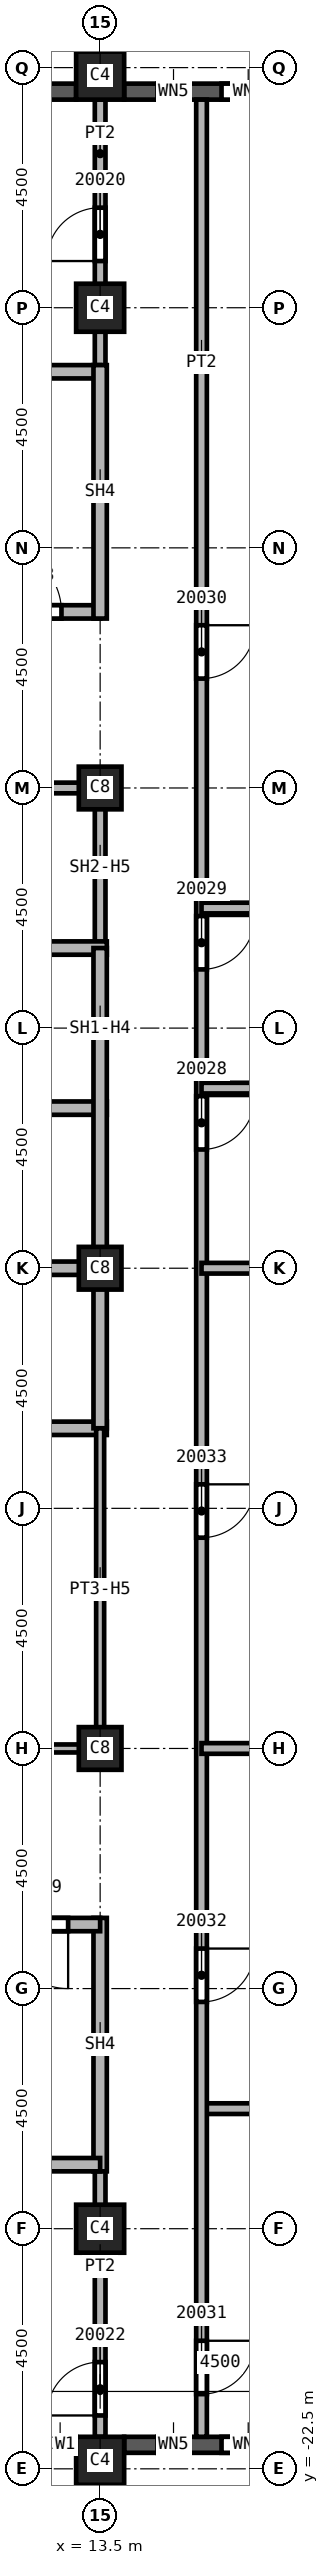
"""IFC4 building model, lengths in metres.
Left out: names, types, materials, properties, quantities, classifications, styles, units other than length and angle.
Written with IfcOpenShell. Run it as: python <this file> out.ifc"""

import sys

from ifc_helpers import new_model, si_unit, direction, frame, frame_2d, origin, origin_2d, place, context, subcontext, project, spatial, rectangle, extrude, element, fill, save


model = new_model("IFC4")
c1 = context("Model", 3, precision=1e-05, world=origin(), true_north=direction((0.0, 1.0)))
c2 = subcontext(c1, "Body", "Model", "MODEL_VIEW")
j1 = project(units=[si_unit("LENGTHUNIT", "METRE"), si_unit("PLANEANGLEUNIT", "RADIAN")], contexts=[c1])
p1 = place(None, origin())
s1 = spatial("IfcSite", under=j1, at=p1, CompositionType="ELEMENT")
p2 = place(p1, origin())
s2 = spatial("IfcBuilding", under=s1, at=p2, CompositionType="ELEMENT")
p3 = place(p2, frame((0.0, 0.0, 290.0)))
s3 = spatial("IfcBuildingStorey", under=s2, at=p3, CompositionType="ELEMENT", Elevation=290.0)
for number, where, z_axis, x_axis in (
    (1, (13.5, 18.0, 0.0), (0.0, 0.0, 1.0), (1.0, 0.0, 0.0)),
    (2, (13.5, -18.0, 0.0), (0.0, 0.0, 1.0), (1.0, 0.0, 0.0)),
):
    element("IfcColumn", number, at=place(p3, frame(where, z_axis=z_axis, x_axis=x_axis)), inside=s3, PredefinedType="COLUMN", context=c2, shape_type="SweptSolid", body=[
        extrude(rectangle(XDim=0.9, YDim=0.9, at=origin_2d()), origin(), (0.0, 0.0, 1.0), 3.59),
    ])
for number, where, z_axis, x_axis in (
    (3, (13.5, 0.0, 0.0), (0.0, 0.0, 1.0), (1.0, 0.0, 0.0)),
    (4, (13.5, 9.0, 0.0), (0.0, 0.0, 1.0), (1.0, 0.0, 0.0)),
    (5, (13.5, -9.0, 0.0), (0.0, 0.0, 1.0), (1.0, 0.0, 0.0)),
):
    element("IfcColumn", number, at=place(p3, frame(where, z_axis=z_axis, x_axis=x_axis)), inside=s3, PredefinedType="COLUMN", context=c2, shape_type="SweptSolid", body=[
        extrude(rectangle(XDim=0.8, YDim=0.8, at=origin_2d()), origin(), (0.0, 0.0, 1.0), 3.59),
    ])
for number, where, z_axis, x_axis in (
    (6, (13.5, 22.35, 0.0), (0.0, 0.0, 1.0), (1.0, 0.0, 0.0)),
    (7, (13.5, -22.35, 0.0), (0.0, 0.0, 1.0), (1.0, 0.0, 0.0)),
):
    element("IfcColumn", number, at=place(p3, frame(where, z_axis=z_axis, x_axis=x_axis)), inside=s3, PredefinedType="COLUMN", context=c2, shape_type="SweptSolid", body=[
        extrude(rectangle(XDim=0.9, YDim=0.9, at=origin_2d()), origin(), (0.0, 0.0, 1.0), 3.59),
    ])
p4 = place(p3, frame((9.45, -22.05, 0.0), z_axis=(0.0, 0.0, 1.0), x_axis=(1.0, 0.0, 0.0)))
e8 = element("IfcWall", 8, at=p4, inside=s3, PredefinedType="SOLIDWALL", context=c2, shape_type="SweptSolid", body=[
    extrude(rectangle(XDim=3.6, YDim=0.3, at=frame_2d((1.8, 0.0))), origin(), (0.0, 0.0, 1.0), 2.99),
])
p5 = place(p4, frame((0.6, 0.0, 0.8)))
e9 = element("IfcOpeningElement", 9, at=p5, cuts=e8, PredefinedType="OPENING", context=c2, shape_type="SweptSolid", body=[
    extrude(rectangle(XDim=2.4, YDim=1.95, at=frame_2d((1.2, 0.975))), frame((0.0, 0.15, 0.0), z_axis=(0.0, -1.0, 0.0), x_axis=(1.0, 0.0, 0.0)), (0.0, 0.0, 1.0), 0.3),
])
p6 = place(p3, frame((13.95, -22.05, 0.0), z_axis=(0.0, 0.0, 1.0), x_axis=(1.0, 0.0, 0.0)))
e10 = element("IfcWall", 10, at=p6, inside=s3, PredefinedType="SOLIDWALL", context=c2, shape_type="SweptSolid", body=[
    extrude(rectangle(XDim=3.6, YDim=0.3, at=frame_2d((1.8, 0.0))), origin(), (0.0, 0.0, 1.0), 2.99),
])
p7 = place(p6, frame((0.625, 0.0, 0.8)))
e11 = element("IfcOpeningElement", 11, at=p7, cuts=e10, PredefinedType="OPENING", context=c2, shape_type="SweptSolid", body=[
    extrude(rectangle(XDim=0.6, YDim=1.95, at=frame_2d((0.3, 0.975))), frame((0.0, 0.15, 0.0), z_axis=(0.0, -1.0, 0.0), x_axis=(1.0, 0.0, 0.0)), (0.0, 0.0, 1.0), 0.3),
])
p8 = place(p6, frame((1.825, 0.0, 0.8)))
e12 = element("IfcOpeningElement", 12, at=p8, cuts=e10, PredefinedType="OPENING", context=c2, shape_type="SweptSolid", body=[
    extrude(rectangle(XDim=1.0, YDim=1.95, at=frame_2d((0.5, 0.975))), frame((0.0, 0.15, 0.0), z_axis=(0.0, -1.0, 0.0), x_axis=(1.0, 0.0, 0.0)), (0.0, 0.0, 1.0), 0.3),
])
p9 = place(p3, frame((17.55, 22.05, 0.0), z_axis=(0.0, 0.0, 1.0), x_axis=(-1.0, 0.0, 0.0)))
e13 = element("IfcWall", 13, at=p9, inside=s3, PredefinedType="SOLIDWALL", context=c2, shape_type="SweptSolid", body=[
    extrude(rectangle(XDim=3.6, YDim=0.3, at=frame_2d((1.8, 0.0))), origin(), (0.0, 0.0, 1.0), 2.99),
])
p10 = place(p9, frame((0.775, 0.0, 0.8)))
e14 = element("IfcOpeningElement", 14, at=p10, cuts=e13, PredefinedType="OPENING", context=c2, shape_type="SweptSolid", body=[
    extrude(rectangle(XDim=1.0, YDim=1.95, at=frame_2d((0.5, 0.975))), frame((0.0, 0.15, 0.0), z_axis=(0.0, -1.0, 0.0), x_axis=(1.0, 0.0, 0.0)), (0.0, 0.0, 1.0), 0.3),
])
p11 = place(p9, frame((2.375, 0.0, 0.8)))
e15 = element("IfcOpeningElement", 15, at=p11, cuts=e13, PredefinedType="OPENING", context=c2, shape_type="SweptSolid", body=[
    extrude(rectangle(XDim=0.6, YDim=1.95, at=frame_2d((0.3, 0.975))), frame((0.0, 0.15, 0.0), z_axis=(0.0, -1.0, 0.0), x_axis=(1.0, 0.0, 0.0)), (0.0, 0.0, 1.0), 0.3),
])
p12 = place(p3, frame((13.05, 22.05, 0.0), z_axis=(0.0, 0.0, 1.0), x_axis=(-1.0, 0.0, 0.0)))
e16 = element("IfcWall", 16, at=p12, inside=s3, PredefinedType="SOLIDWALL", context=c2, shape_type="SweptSolid", body=[
    extrude(rectangle(XDim=3.6, YDim=0.3, at=frame_2d((1.8, 0.0))), origin(), (0.0, 0.0, 1.0), 2.99),
])
p13 = place(p12, frame((0.6, 0.0, 0.8)))
e17 = element("IfcOpeningElement", 17, at=p13, cuts=e16, PredefinedType="OPENING", context=c2, shape_type="SweptSolid", body=[
    extrude(rectangle(XDim=2.4, YDim=1.95, at=frame_2d((1.2, 0.975))), frame((0.0, 0.15, 0.0), z_axis=(0.0, -1.0, 0.0), x_axis=(1.0, 0.0, 0.0)), (0.0, 0.0, 1.0), 0.3),
])
p14 = place(p3, frame((13.5, -21.9, 0.0), z_axis=(0.0, 0.0, 1.0), x_axis=(0.0, 1.0, 0.0)))
e18 = element("IfcWall", 18, at=p14, inside=s3, PredefinedType="PARTITIONING", context=c2, shape_type="SweptSolid", body=[
    extrude(rectangle(XDim=5.225, YDim=0.2, at=frame_2d((2.612, 0.0))), origin(), (0.0, 0.0, 1.0), 3.59),
])
p15 = place(p14, frame((0.4, 0.0, 0.0)))
e19 = element("IfcOpeningElement", 19, at=p15, cuts=e18, PredefinedType="OPENING", context=c2, shape_type="SweptSolid", body=[
    extrude(rectangle(XDim=1.0, YDim=2.1, at=frame_2d((0.5, 1.05))), frame((0.0, 0.1, 0.0), z_axis=(0.0, -1.0, 0.0), x_axis=(1.0, 0.0, 0.0)), (0.0, 0.0, 1.0), 0.2),
])
p16 = place(p3, frame((13.5, 16.675, 0.0), z_axis=(0.0, 0.0, 1.0), x_axis=(0.0, 1.0, 0.0)))
e20 = element("IfcWall", 20, at=p16, inside=s3, PredefinedType="PARTITIONING", context=c2, shape_type="SweptSolid", body=[
    extrude(rectangle(XDim=5.225, YDim=0.2, at=frame_2d((2.612, 0.0))), origin(), (0.0, 0.0, 1.0), 3.59),
])
p17 = place(p16, frame((2.2, 0.0, 0.0)))
e21 = element("IfcOpeningElement", 21, at=p17, cuts=e20, PredefinedType="OPENING", context=c2, shape_type="SweptSolid", body=[
    extrude(rectangle(XDim=1.0, YDim=2.1, at=frame_2d((0.5, 1.05))), frame((0.0, 0.1, 0.0), z_axis=(0.0, -1.0, 0.0), x_axis=(1.0, 0.0, 0.0)), (0.0, 0.0, 1.0), 0.2),
])
p18 = place(p3, frame((15.4, -15.75, 0.0), z_axis=(0.0, 0.0, 1.0), x_axis=(1.0, 0.0, 0.0)))
e22 = element("IfcWall", 22, at=p18, inside=s3, PredefinedType="PARTITIONING", context=c2, shape_type="SweptSolid", body=[
    extrude(rectangle(XDim=11.15, YDim=0.2, at=frame_2d((5.575, 0.0))), origin(), (0.0, 0.0, 1.0), 3.59),
])
p19 = place(p3, frame((15.4, 21.9, 0.0), z_axis=(0.0, 0.0, 1.0), x_axis=(0.0, -1.0, 0.0)))
e23 = element("IfcWall", 23, at=p19, inside=s3, PredefinedType="PARTITIONING", context=c2, shape_type="SweptSolid", body=[
    extrude(rectangle(XDim=43.8, YDim=0.2, at=frame_2d((21.9, 0.0))), origin(), (0.0, 0.0, 1.0), 3.59),
])
p20 = place(p19, frame((18.675, 0.0, 0.0)))
e24 = element("IfcOpeningElement", 24, at=p20, cuts=e23, PredefinedType="OPENING", context=c2, shape_type="SweptSolid", body=[
    extrude(rectangle(XDim=1.0, YDim=2.1, at=frame_2d((0.5, 1.05))), frame((0.0, 0.1, 0.0), z_axis=(0.0, -1.0, 0.0), x_axis=(1.0, 0.0, 0.0)), (0.0, 0.0, 1.0), 0.2),
])
p21 = place(p19, frame((15.3, 0.0, 0.0)))
e25 = element("IfcOpeningElement", 25, at=p21, cuts=e23, PredefinedType="OPENING", context=c2, shape_type="SweptSolid", body=[
    extrude(rectangle(XDim=1.0, YDim=2.1, at=frame_2d((0.5, 1.05))), frame((0.0, 0.1, 0.0), z_axis=(0.0, -1.0, 0.0), x_axis=(1.0, 0.0, 0.0)), (0.0, 0.0, 1.0), 0.2),
])
p22 = place(p19, frame((9.85, 0.0, 0.0)))
e26 = element("IfcOpeningElement", 26, at=p22, cuts=e23, PredefinedType="OPENING", context=c2, shape_type="SweptSolid", body=[
    extrude(rectangle(XDim=1.0, YDim=2.1, at=frame_2d((0.5, 1.05))), frame((0.0, 0.1, 0.0), z_axis=(0.0, -1.0, 0.0), x_axis=(1.0, 0.0, 0.0)), (0.0, 0.0, 1.0), 0.2),
])
p23 = place(p19, frame((42.0, 0.0, 0.0)))
e27 = element("IfcOpeningElement", 27, at=p23, cuts=e23, PredefinedType="OPENING", context=c2, shape_type="SweptSolid", body=[
    extrude(rectangle(XDim=1.0, YDim=2.1, at=frame_2d((0.5, 1.05))), frame((0.0, 0.1, 0.0), z_axis=(0.0, -1.0, 0.0), x_axis=(1.0, 0.0, 0.0)), (0.0, 0.0, 1.0), 0.2),
])
p24 = place(p19, frame((34.65, 0.0, 0.0)))
e28 = element("IfcOpeningElement", 28, at=p24, cuts=e23, PredefinedType="OPENING", context=c2, shape_type="SweptSolid", body=[
    extrude(rectangle(XDim=1.0, YDim=2.1, at=frame_2d((0.5, 1.05))), frame((0.0, 0.1, 0.0), z_axis=(0.0, -1.0, 0.0), x_axis=(1.0, 0.0, 0.0)), (0.0, 0.0, 1.0), 0.2),
])
p25 = place(p19, frame((25.95, 0.0, 0.0)))
e29 = element("IfcOpeningElement", 29, at=p25, cuts=e23, PredefinedType="OPENING", context=c2, shape_type="SweptSolid", body=[
    extrude(rectangle(XDim=1.0, YDim=2.1, at=frame_2d((0.5, 1.05))), frame((0.0, 0.1, 0.0), z_axis=(0.0, -1.0, 0.0), x_axis=(1.0, 0.0, 0.0)), (0.0, 0.0, 1.0), 0.2),
])
p26 = place(p3, frame((15.4, -9.0, 0.0), z_axis=(0.0, 0.0, 1.0), x_axis=(1.0, 0.0, 0.0)))
e30 = element("IfcWall", 30, at=p26, inside=s3, PredefinedType="PARTITIONING", context=c2, shape_type="SweptSolid", body=[
    extrude(rectangle(XDim=4.6, YDim=0.2, at=frame_2d((2.3, 0.0))), origin(), (0.0, 0.0, 1.0), 3.59),
])
for number, where, z_axis, x_axis in (
    (31, (15.4, 3.375, 0.0), (0.0, 0.0, 1.0), (1.0, 0.0, 0.0)),
    (32, (15.4, 6.75, 0.0), (0.0, 0.0, 1.0), (1.0, 0.0, 0.0)),
    (33, (26.55, 0.0, 0.0), (0.0, 0.0, 1.0), (-1.0, 0.0, 0.0)),
):
    element("IfcWall", number, at=place(p3, frame(where, z_axis=z_axis, x_axis=x_axis)), inside=s3, PredefinedType="PARTITIONING", context=c2, shape_type="SweptSolid", body=[
        extrude(rectangle(XDim=11.15, YDim=0.2, at=frame_2d((5.575, 0.0))), origin(), (0.0, 0.0, 1.0), 3.59),
    ])
p27 = place(p3, frame((10.5, 9.0, 0.0), z_axis=(0.0, 0.0, 1.0), x_axis=(1.0, 0.0, 0.0)))
e34 = element("IfcWall", 34, at=p27, inside=s3, PredefinedType="SOLIDWALL", context=c2, shape_type="SweptSolid", body=[
    extrude(rectangle(XDim=3.0, YDim=0.2, at=frame_2d((1.5, 0.0))), origin(), (0.0, 0.0, 1.0), 2.828),
])
p28 = place(p3, frame((13.5, 9.1, 0.0), z_axis=(0.0, 0.0, 1.0), x_axis=(0.0, -1.0, 0.0)))
e35 = element("IfcWall", 35, at=p28, inside=s3, PredefinedType="SOLIDWALL", context=c2, shape_type="SweptSolid", body=[
    extrude(rectangle(XDim=3.1, YDim=0.2, at=frame_2d((1.55, 0.0))), origin(), (0.0, 0.0, 1.0), 2.828),
])
p29 = place(p3, frame((4.375, -3.0, 0.0), z_axis=(0.0, 0.0, 1.0), x_axis=(1.0, 0.0, 0.0)))
e36 = element("IfcWall", 36, at=p29, inside=s3, PredefinedType="SOLIDWALL", context=c2, shape_type="SweptSolid", body=[
    extrude(rectangle(XDim=9.25, YDim=0.25, at=frame_2d((4.625, 0.0))), origin(), (0.0, 0.0, 1.0), 3.59),
])
p30 = place(p29, frame((3.375, 0.0, 0.0)))
e37 = element("IfcOpeningElement", 37, at=p30, cuts=e36, PredefinedType="OPENING", context=c2, shape_type="SweptSolid", body=[
    extrude(rectangle(XDim=1.1, YDim=2.1, at=frame_2d((0.55, 1.05))), frame((0.0, 0.125, 0.0), z_axis=(0.0, -1.0, 0.0), x_axis=(1.0, 0.0, 0.0)), (0.0, 0.0, 1.0), 0.25),
])
p31 = place(p3, frame((7.5, 3.0, 0.0), z_axis=(0.0, 0.0, 1.0), x_axis=(1.0, 0.0, 0.0)))
e38 = element("IfcWall", 38, at=p31, inside=s3, PredefinedType="SOLIDWALL", context=c2, shape_type="SweptSolid", body=[
    extrude(rectangle(XDim=6.125, YDim=0.25, at=frame_2d((3.062, 0.0))), origin(), (0.0, 0.0, 1.0), 3.59),
])
p32 = place(p31, frame((0.25, 0.0, 0.0)))
e39 = element("IfcOpeningElement", 39, at=p32, cuts=e38, PredefinedType="OPENING", context=c2, shape_type="SweptSolid", body=[
    extrude(rectangle(XDim=1.1, YDim=2.1, at=frame_2d((0.55, 1.05))), frame((0.0, 0.125, 0.0), z_axis=(0.0, -1.0, 0.0), x_axis=(1.0, 0.0, 0.0)), (0.0, 0.0, 1.0), 0.25),
])
for number, where, z_axis, x_axis in (
    (40, (10.5, 0.0, 0.0), (0.0, 0.0, 1.0), (1.0, 0.0, 0.0)),
    (41, (10.5, 6.0, 0.0), (0.0, 0.0, 1.0), (1.0, 0.0, 0.0)),
):
    element("IfcWall", number, at=place(p3, frame(where, z_axis=z_axis, x_axis=x_axis)), inside=s3, PredefinedType="SOLIDWALL", context=c2, shape_type="SweptSolid", body=[
        extrude(rectangle(XDim=3.125, YDim=0.25, at=frame_2d((1.562, 0.0))), origin(), (0.0, 0.0, 1.0), 3.59),
    ])
p33 = place(p3, frame((13.5, 6.0, 0.0), z_axis=(0.0, 0.0, 1.0), x_axis=(0.0, -1.0, 0.0)))
e42 = element("IfcWall", 42, at=p33, inside=s3, PredefinedType="SOLIDWALL", context=c2, shape_type="SweptSolid", body=[
    extrude(rectangle(XDim=9.0, YDim=0.25, at=frame_2d((4.5, 0.0))), origin(), (0.0, 0.0, 1.0), 2.828),
])
p34 = place(p3, frame((4.375, 12.3, 0.0), z_axis=(0.0, 0.0, 1.0), x_axis=(1.0, 0.0, 0.0)))
e43 = element("IfcWall", 43, at=p34, inside=s3, PredefinedType="SOLIDWALL", context=c2, shape_type="SweptSolid", body=[
    extrude(rectangle(XDim=9.125, YDim=0.25, at=frame_2d((4.562, 0.0))), origin(), (0.0, 0.0, 1.0), 3.59),
])
p35 = place(p34, frame((7.2, 0.0, 0.0)))
e44 = element("IfcOpeningElement", 44, at=p35, cuts=e43, PredefinedType="OPENING", context=c2, shape_type="SweptSolid", body=[
    extrude(rectangle(XDim=1.2, YDim=2.1, at=frame_2d((0.6, 1.05))), frame((0.0, 0.125, 0.0), z_axis=(0.0, -1.0, 0.0), x_axis=(1.0, 0.0, 0.0)), (0.0, 0.0, 1.0), 0.25),
])
p36 = place(p3, frame((4.375, 16.8, 0.0), z_axis=(0.0, 0.0, 1.0), x_axis=(1.0, 0.0, 0.0)))
e45 = element("IfcWall", 45, at=p36, inside=s3, PredefinedType="SOLIDWALL", context=c2, shape_type="SweptSolid", body=[
    extrude(rectangle(XDim=9.125, YDim=0.25, at=frame_2d((4.562, 0.0))), origin(), (0.0, 0.0, 1.0), 3.59),
])
p37 = place(p3, frame((13.5, -16.925, 0.0), z_axis=(0.0, 0.0, 1.0), x_axis=(0.0, 1.0, 0.0)))
e46 = element("IfcWall", 46, at=p37, inside=s3, PredefinedType="SOLIDWALL", context=c2, shape_type="SweptSolid", body=[
    extrude(rectangle(XDim=4.75, YDim=0.25, at=frame_2d((2.375, 0.0))), origin(), (0.0, 0.0, 1.0), 3.59),
])
p38 = place(p3, frame((13.5, -16.8, 0.0), z_axis=(0.0, 0.0, 1.0), x_axis=(-1.0, 0.0, 0.0)))
e47 = element("IfcWall", 47, at=p38, inside=s3, PredefinedType="SOLIDWALL", context=c2, shape_type="SweptSolid", body=[
    extrude(rectangle(XDim=9.125, YDim=0.25, at=frame_2d((4.562, 0.0))), origin(), (0.0, 0.0, 1.0), 3.59),
])
p39 = place(p3, frame((13.5, -12.3, 0.0), z_axis=(0.0, 0.0, 1.0), x_axis=(-1.0, 0.0, 0.0)))
e48 = element("IfcWall", 48, at=p39, inside=s3, PredefinedType="SOLIDWALL", context=c2, shape_type="SweptSolid", body=[
    extrude(rectangle(XDim=9.125, YDim=0.25, at=frame_2d((4.562, 0.0))), origin(), (0.0, 0.0, 1.0), 3.59),
])
p40 = place(p39, frame((0.6, 0.0, 0.0)))
e49 = element("IfcOpeningElement", 49, at=p40, cuts=e48, PredefinedType="OPENING", context=c2, shape_type="SweptSolid", body=[
    extrude(rectangle(XDim=1.2, YDim=2.1, at=frame_2d((0.6, 1.05))), frame((0.0, 0.125, 0.0), z_axis=(0.0, -1.0, 0.0), x_axis=(1.0, 0.0, 0.0)), (0.0, 0.0, 1.0), 0.25),
])
p41 = place(p3, frame((13.5, 12.175, 0.0), z_axis=(0.0, 0.0, 1.0), x_axis=(0.0, 1.0, 0.0)))
e50 = element("IfcWall", 50, at=p41, inside=s3, PredefinedType="SOLIDWALL", context=c2, shape_type="SweptSolid", body=[
    extrude(rectangle(XDim=4.75, YDim=0.25, at=frame_2d((2.375, 0.0))), origin(), (0.0, 0.0, 1.0), 3.59),
])
p42 = place(p3, frame((13.5, -9.0, 0.0), z_axis=(0.0, 0.0, 1.0), x_axis=(-1.0, 0.0, 0.0)))
e51 = element("IfcWall", 51, at=p42, inside=s3, PredefinedType="PARTITIONING", context=c2, shape_type="SweptSolid", body=[
    extrude(rectangle(XDim=3.0, YDim=0.15, at=frame_2d((1.5, 0.0))), origin(), (0.0, 0.0, 1.0), 2.828),
])
p43 = place(p3, frame((13.5, -3.0, 0.0), z_axis=(0.0, 0.0, 1.0), x_axis=(0.0, -1.0, 0.0)))
e52 = element("IfcWall", 52, at=p43, inside=s3, PredefinedType="PARTITIONING", context=c2, shape_type="SweptSolid", body=[
    extrude(rectangle(XDim=6.075, YDim=0.15, at=frame_2d((3.038, 0.0))), origin(), (0.0, 0.0, 1.0), 2.828),
])
p44 = place(p35, origin())
e53 = element("IfcDoor", 53, at=p44, inside=s3, OperationType="SINGLE_SWING_LEFT", PredefinedType="DOOR", context=c2, shape_type="SweptSolid", body=[
    extrude(rectangle(XDim=1.2, YDim=2.1, at=frame_2d((0.6, 1.05))), frame((0.0, 0.025, 0.0), z_axis=(0.0, -1.0, 0.0), x_axis=(1.0, 0.0, 0.0)), (0.0, 0.0, 1.0), 0.05),
])
fill(e44, e53)
p45 = place(p40, origin())
e54 = element("IfcDoor", 54, at=p45, inside=s3, OperationType="SINGLE_SWING_RIGHT", PredefinedType="DOOR", context=c2, shape_type="SweptSolid", body=[
    extrude(rectangle(XDim=1.2, YDim=2.1, at=frame_2d((0.6, 1.05))), frame((0.0, 0.025, 0.0), z_axis=(0.0, -1.0, 0.0), x_axis=(1.0, 0.0, 0.0)), (0.0, 0.0, 1.0), 0.05),
])
fill(e49, e54)
p46 = place(p17, origin())
e55 = element("IfcDoor", 55, at=p46, inside=s3, OperationType="SINGLE_SWING_LEFT", PredefinedType="DOOR", context=c2, shape_type="SweptSolid", body=[
    extrude(rectangle(XDim=1.0, YDim=2.1, at=frame_2d((0.5, 1.05))), frame((0.0, 0.025, 0.0), z_axis=(0.0, -1.0, 0.0), x_axis=(1.0, 0.0, 0.0)), (0.0, 0.0, 1.0), 0.05),
])
fill(e21, e55)
p47 = place(p15, origin())
e56 = element("IfcDoor", 56, at=p47, inside=s3, OperationType="SINGLE_SWING_LEFT", PredefinedType="DOOR", context=c2, shape_type="SweptSolid", body=[
    extrude(rectangle(XDim=1.0, YDim=2.1, at=frame_2d((0.5, 1.05))), frame((0.0, 0.025, 0.0), z_axis=(0.0, -1.0, 0.0), x_axis=(1.0, 0.0, 0.0)), (0.0, 0.0, 1.0), 0.05),
])
fill(e19, e56)
p48 = place(p20, origin())
e57 = element("IfcDoor", 57, at=p48, inside=s3, OperationType="SINGLE_SWING_LEFT", PredefinedType="DOOR", context=c2, shape_type="SweptSolid", body=[
    extrude(rectangle(XDim=1.0, YDim=2.1, at=frame_2d((0.5, 1.05))), frame((0.0, 0.025, 0.0), z_axis=(0.0, -1.0, 0.0), x_axis=(1.0, 0.0, 0.0)), (0.0, 0.0, 1.0), 0.05),
])
fill(e24, e57)
p49 = place(p21, origin())
e58 = element("IfcDoor", 58, at=p49, inside=s3, OperationType="SINGLE_SWING_RIGHT", PredefinedType="DOOR", context=c2, shape_type="SweptSolid", body=[
    extrude(rectangle(XDim=1.0, YDim=2.1, at=frame_2d((0.5, 1.05))), frame((0.0, 0.025, 0.0), z_axis=(0.0, -1.0, 0.0), x_axis=(1.0, 0.0, 0.0)), (0.0, 0.0, 1.0), 0.05),
])
fill(e25, e58)
p50 = place(p22, origin())
e59 = element("IfcDoor", 59, at=p50, inside=s3, OperationType="SINGLE_SWING_LEFT", PredefinedType="DOOR", context=c2, shape_type="SweptSolid", body=[
    extrude(rectangle(XDim=1.0, YDim=2.1, at=frame_2d((0.5, 1.05))), frame((0.0, 0.025, 0.0), z_axis=(0.0, -1.0, 0.0), x_axis=(1.0, 0.0, 0.0)), (0.0, 0.0, 1.0), 0.05),
])
fill(e26, e59)
p51 = place(p23, origin())
e60 = element("IfcDoor", 60, at=p51, inside=s3, OperationType="SINGLE_SWING_RIGHT", PredefinedType="DOOR", context=c2, shape_type="SweptSolid", body=[
    extrude(rectangle(XDim=1.0, YDim=2.1, at=frame_2d((0.5, 1.05))), frame((0.0, 0.025, 0.0), z_axis=(0.0, -1.0, 0.0), x_axis=(1.0, 0.0, 0.0)), (0.0, 0.0, 1.0), 0.05),
])
fill(e27, e60)
p52 = place(p24, origin())
e61 = element("IfcDoor", 61, at=p52, inside=s3, OperationType="SINGLE_SWING_LEFT", PredefinedType="DOOR", context=c2, shape_type="SweptSolid", body=[
    extrude(rectangle(XDim=1.0, YDim=2.1, at=frame_2d((0.5, 1.05))), frame((0.0, 0.025, 0.0), z_axis=(0.0, -1.0, 0.0), x_axis=(1.0, 0.0, 0.0)), (0.0, 0.0, 1.0), 0.05),
])
fill(e28, e61)
p53 = place(p25, origin())
e62 = element("IfcDoor", 62, at=p53, inside=s3, OperationType="SINGLE_SWING_RIGHT", PredefinedType="DOOR", context=c2, shape_type="SweptSolid", body=[
    extrude(rectangle(XDim=1.0, YDim=2.1, at=frame_2d((0.5, 1.05))), frame((0.0, 0.025, 0.0), z_axis=(0.0, -1.0, 0.0), x_axis=(1.0, 0.0, 0.0)), (0.0, 0.0, 1.0), 0.05),
])
fill(e29, e62)
p54 = place(p7, origin())
e63 = element("IfcWindow", 63, at=p54, inside=s3, PartitioningType="SINGLE_PANEL", PredefinedType="WINDOW", context=c2, shape_type="SweptSolid", body=[
    extrude(rectangle(XDim=0.6, YDim=1.95, at=frame_2d((0.3, 0.975))), frame((0.0, 0.03, 0.0), z_axis=(0.0, -1.0, 0.0), x_axis=(1.0, 0.0, 0.0)), (0.0, 0.0, 1.0), 0.06),
])
fill(e11, e63)
p55 = place(p8, origin())
e64 = element("IfcWindow", 64, at=p55, inside=s3, PartitioningType="SINGLE_PANEL", PredefinedType="WINDOW", context=c2, shape_type="SweptSolid", body=[
    extrude(rectangle(XDim=1.0, YDim=1.95, at=frame_2d((0.5, 0.975))), frame((0.0, 0.03, 0.0), z_axis=(0.0, -1.0, 0.0), x_axis=(1.0, 0.0, 0.0)), (0.0, 0.0, 1.0), 0.06),
])
fill(e12, e64)
p56 = place(p10, origin())
e65 = element("IfcWindow", 65, at=p56, inside=s3, PartitioningType="SINGLE_PANEL", PredefinedType="WINDOW", context=c2, shape_type="SweptSolid", body=[
    extrude(rectangle(XDim=1.0, YDim=1.95, at=frame_2d((0.5, 0.975))), frame((0.0, 0.03, 0.0), z_axis=(0.0, -1.0, 0.0), x_axis=(1.0, 0.0, 0.0)), (0.0, 0.0, 1.0), 0.06),
])
fill(e14, e65)
p57 = place(p11, origin())
e66 = element("IfcWindow", 66, at=p57, inside=s3, PartitioningType="SINGLE_PANEL", PredefinedType="WINDOW", context=c2, shape_type="SweptSolid", body=[
    extrude(rectangle(XDim=0.6, YDim=1.95, at=frame_2d((0.3, 0.975))), frame((0.0, 0.03, 0.0), z_axis=(0.0, -1.0, 0.0), x_axis=(1.0, 0.0, 0.0)), (0.0, 0.0, 1.0), 0.06),
])
fill(e15, e66)
save(model, sys.argv[1])
